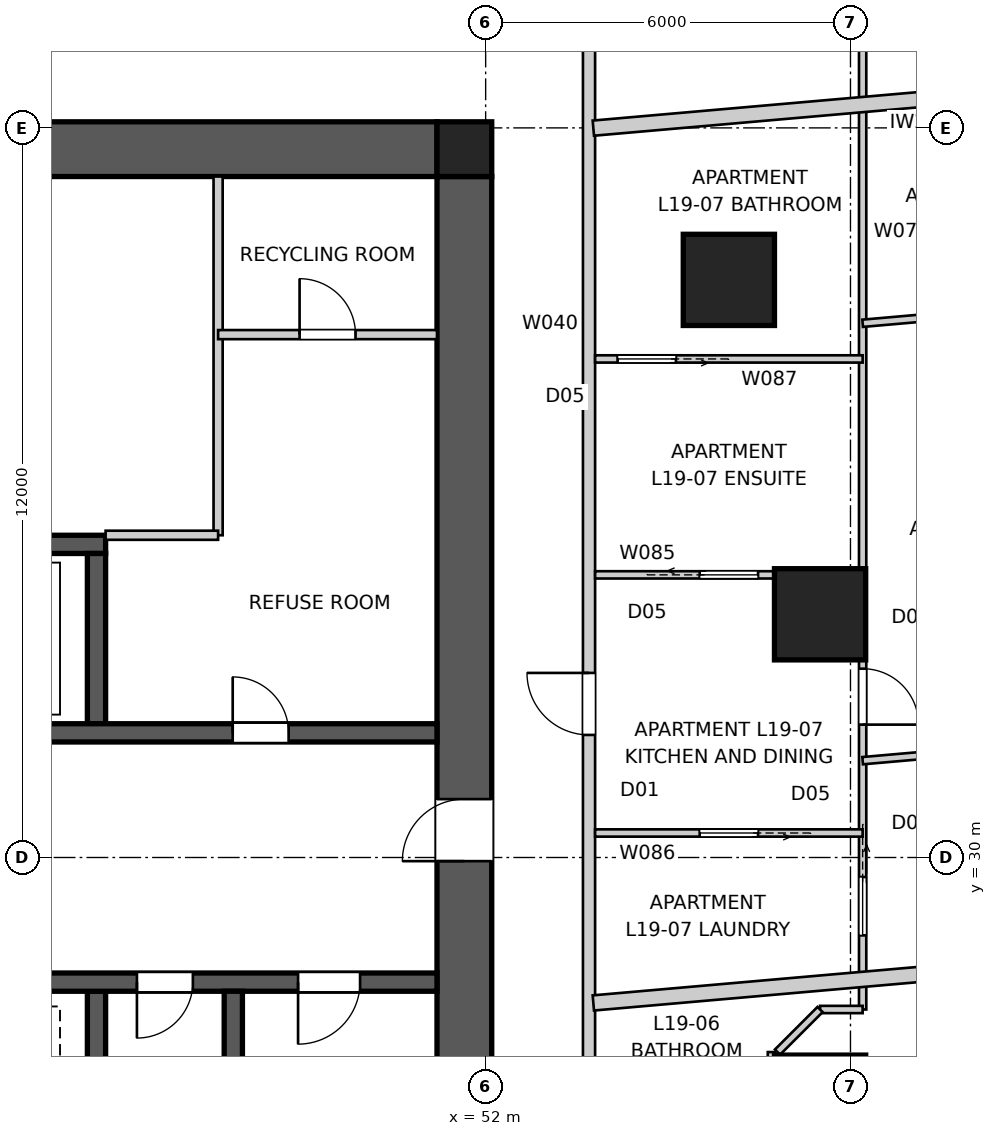
"""IFC4 building model, lengths in metres.
Left out: names, types, materials, properties, quantities, classifications, styles, units other than length and angle.
Written with IfcOpenShell. Run it as: python <this file> out.ifc"""

import sys

from ifc_helpers import new_model, si_unit, direction, frame, frame_2d, origin, origin_2d, place, context, subcontext, project, spatial, polyline, rectangle, outline, extrude, element, fill, save


model = new_model("IFC4")
c1 = context("Model", 3, precision=1e-05, world=origin(), true_north=direction((0.0, 1.0)))
c2 = subcontext(c1, "Body", "Model", "MODEL_VIEW")
j1 = project(units=[si_unit("LENGTHUNIT", "METRE"), si_unit("PLANEANGLEUNIT", "RADIAN")], contexts=[c1])
p1 = place(None, origin())
s1 = spatial("IfcSite", under=j1, at=p1, CompositionType="ELEMENT")
p2 = place(p1, origin())
s2 = spatial("IfcBuilding", under=s1, at=p2, CompositionType="ELEMENT")
p3 = place(p2, frame((0.0, 0.0, 71.0)))
s3 = spatial("IfcBuildingStorey", under=s2, at=p3, CompositionType="ELEMENT", Elevation=71.0)
p4 = place(p3, frame((28.8, 41.65, 0.0), z_axis=(0.0, 0.0, 1.0), x_axis=(1.0, 0.0, 0.0)))
e1 = element("IfcWall", 1, at=p4, inside=s3, PredefinedType="SHEAR", context=c2, shape_type="SweptSolid", body=[
    extrude(outline(polyline([(0.0, -0.45), (22.4, -0.45), (22.4, -0.025), (22.85, -0.025), (22.85, 0.025), (22.4, 0.025), (22.4, 0.45), (0.0, 0.45), (0.0, 0.025), (-0.45, 0.025), (-0.45, -0.025), (0.0, -0.025), (0.0, -0.45)])), origin(), (0.0, 0.0, 1.0), 3.4),
])
p5 = place(p3, frame((51.65, 18.8, 0.0), z_axis=(0.0, 0.0, 1.0), x_axis=(0.0, 1.0, 0.0)))
e2 = element("IfcWall", 2, at=p5, inside=s3, PredefinedType="SHEAR", context=c2, shape_type="SweptSolid", body=[
    extrude(outline(polyline([(0.0, -0.45), (22.4, -0.45), (22.4, -0.025), (22.85, -0.025), (22.85, 0.025), (22.4, 0.025), (22.4, 0.45), (0.0, 0.45), (0.0, 0.025), (-0.45, 0.025), (-0.45, -0.025), (0.0, -0.025), (0.0, -0.45)])), origin(), (0.0, 0.0, 1.0), 3.4),
])
p6 = place(p5, frame((11.14, 0.0, 0.0)))
e3 = element("IfcOpeningElement", 3, at=p6, cuts=e2, PredefinedType="OPENING", context=c2, shape_type="SweptSolid", body=[
    extrude(rectangle(XDim=1.02, YDim=2.4, at=frame_2d((0.51, 1.2))), frame((0.0, 0.46, 0.0), z_axis=(0.0, -1.0, 0.0), x_axis=(1.0, 0.0, 0.0)), (0.0, 0.0, 1.0), 0.92),
])
p7 = place(p3, frame((28.8, 32.05, 0.0), z_axis=(0.0, 0.0, 1.0), x_axis=(1.0, 0.0, 0.0)))
e4 = element("IfcWall", 4, at=p7, inside=s3, PredefinedType="SHEAR", context=c2, shape_type="SweptSolid", body=[
    extrude(rectangle(XDim=22.4, YDim=0.3, at=frame_2d((11.2, 0.0))), origin(), (0.0, 0.0, 1.0), 3.4),
])
p8 = place(p7, frame((19.04, 0.0, 0.0)))
e5 = element("IfcOpeningElement", 5, at=p8, cuts=e4, PredefinedType="OPENING", context=c2, shape_type="SweptSolid", body=[
    extrude(rectangle(XDim=0.92, YDim=2.1, at=frame_2d((0.46, 1.05))), frame((0.0, 0.16, 0.0), z_axis=(0.0, -1.0, 0.0), x_axis=(1.0, 0.0, 0.0)), (0.0, 0.0, 1.0), 0.32),
])
p9 = place(p7, frame((1.265, 0.0, 0.0)))
e6 = element("IfcOpeningElement", 6, at=p9, cuts=e4, PredefinedType="OPENING", context=c2, shape_type="SweptSolid", body=[
    extrude(rectangle(XDim=1.02, YDim=2.1, at=frame_2d((0.51, 1.05))), frame((0.0, 0.16, 0.0), z_axis=(0.0, -1.0, 0.0), x_axis=(1.0, 0.0, 0.0)), (0.0, 0.0, 1.0), 0.32),
])
p10 = place(p7, frame((4.015, 0.0, 0.0)))
e7 = element("IfcOpeningElement", 7, at=p10, cuts=e4, PredefinedType="OPENING", context=c2, shape_type="SweptSolid", body=[
    extrude(rectangle(XDim=0.92, YDim=2.1, at=frame_2d((0.46, 1.05))), frame((0.0, 0.16, 0.0), z_axis=(0.0, -1.0, 0.0), x_axis=(1.0, 0.0, 0.0)), (0.0, 0.0, 1.0), 0.32),
])
p11 = place(p7, frame((6.45, 0.0, 0.0)))
e8 = element("IfcOpeningElement", 8, at=p11, cuts=e4, PredefinedType="OPENING", context=c2, shape_type="SweptSolid", body=[
    extrude(rectangle(XDim=1.1, YDim=2.1, at=frame_2d((0.55, 1.05))), frame((0.0, 0.16, 0.0), z_axis=(0.0, -1.0, 0.0), x_axis=(1.0, 0.0, 0.0)), (0.0, 0.0, 1.0), 0.32),
])
p12 = place(p7, frame((9.25, 0.0, 0.0)))
e9 = element("IfcOpeningElement", 9, at=p12, cuts=e4, PredefinedType="OPENING", context=c2, shape_type="SweptSolid", body=[
    extrude(rectangle(XDim=1.1, YDim=2.1, at=frame_2d((0.55, 1.05))), frame((0.0, 0.16, 0.0), z_axis=(0.0, -1.0, 0.0), x_axis=(1.0, 0.0, 0.0)), (0.0, 0.0, 1.0), 0.32),
])
p13 = place(p7, frame((14.85, 0.0, 0.0)))
e10 = element("IfcOpeningElement", 10, at=p13, cuts=e4, PredefinedType="OPENING", context=c2, shape_type="SweptSolid", body=[
    extrude(rectangle(XDim=1.1, YDim=2.1, at=frame_2d((0.55, 1.05))), frame((0.0, 0.16, 0.0), z_axis=(0.0, -1.0, 0.0), x_axis=(1.0, 0.0, 0.0)), (0.0, 0.0, 1.0), 0.32),
])
p14 = place(p3, frame((51.2, 27.95, 0.0), z_axis=(0.0, 0.0, 1.0), x_axis=(-1.0, 0.0, 0.0)))
e11 = element("IfcWall", 11, at=p14, inside=s3, PredefinedType="SHEAR", context=c2, shape_type="SweptSolid", body=[
    extrude(rectangle(XDim=22.4, YDim=0.3, at=frame_2d((11.2, 0.0))), origin(), (0.0, 0.0, 1.0), 3.4),
])
p15 = place(p14, frame((19.04, 0.0, 0.0)))
e12 = element("IfcOpeningElement", 12, at=p15, cuts=e11, PredefinedType="OPENING", context=c2, shape_type="SweptSolid", body=[
    extrude(rectangle(XDim=0.92, YDim=2.1, at=frame_2d((0.46, 1.05))), frame((0.0, 0.16, 0.0), z_axis=(0.0, -1.0, 0.0), x_axis=(1.0, 0.0, 0.0)), (0.0, 0.0, 1.0), 0.32),
])
p16 = place(p14, frame((1.265, 0.0, 0.0)))
e13 = element("IfcOpeningElement", 13, at=p16, cuts=e11, PredefinedType="OPENING", context=c2, shape_type="SweptSolid", body=[
    extrude(rectangle(XDim=1.02, YDim=2.1, at=frame_2d((0.51, 1.05))), frame((0.0, 0.16, 0.0), z_axis=(0.0, -1.0, 0.0), x_axis=(1.0, 0.0, 0.0)), (0.0, 0.0, 1.0), 0.32),
])
p17 = place(p14, frame((4.015, 0.0, 0.0)))
e14 = element("IfcOpeningElement", 14, at=p17, cuts=e11, PredefinedType="OPENING", context=c2, shape_type="SweptSolid", body=[
    extrude(rectangle(XDim=0.92, YDim=2.1, at=frame_2d((0.46, 1.05))), frame((0.0, 0.16, 0.0), z_axis=(0.0, -1.0, 0.0), x_axis=(1.0, 0.0, 0.0)), (0.0, 0.0, 1.0), 0.32),
])
p18 = place(p14, frame((14.85, 0.0, 0.0)))
e15 = element("IfcOpeningElement", 15, at=p18, cuts=e11, PredefinedType="OPENING", context=c2, shape_type="SweptSolid", body=[
    extrude(rectangle(XDim=1.1, YDim=2.1, at=frame_2d((0.55, 1.05))), frame((0.0, 0.16, 0.0), z_axis=(0.0, -1.0, 0.0), x_axis=(1.0, 0.0, 0.0)), (0.0, 0.0, 1.0), 0.32),
])
p19 = place(p3, frame((34.25, 35.15, 0.0), z_axis=(0.0, 0.0, 1.0), x_axis=(1.0, 0.0, 0.0)))
e16 = element("IfcWall", 16, at=p19, inside=s3, PredefinedType="SHEAR", context=c2, shape_type="SweptSolid", body=[
    extrude(rectangle(XDim=11.5, YDim=0.3, at=frame_2d((5.75, 0.0))), origin(), (0.0, 0.0, 1.0), 3.4),
])
for number, where, z_axis, x_axis in (
    (17, (45.6, 27.8, 0.0), (0.0, 0.0, 1.0), (0.0, -1.0, 0.0)),
    (18, (45.6, 32.2, 0.0), (0.0, 0.0, 1.0), (0.0, 1.0, 0.0)),
):
    element("IfcWall", number, at=place(p3, frame(where, z_axis=z_axis, x_axis=x_axis)), inside=s3, PredefinedType="SHEAR", context=c2, shape_type="SweptSolid", body=[
        extrude(rectangle(XDim=2.8, YDim=0.3, at=frame_2d((1.4, 0.0))), origin(), (0.0, 0.0, 1.0), 3.4),
    ])
p20 = place(p3, frame((47.85, 27.8, 0.0), z_axis=(0.0, 0.0, 1.0), x_axis=(0.0, -1.0, 0.0)))
e19 = element("IfcWall", 19, at=p20, inside=s3, PredefinedType="SHEAR", context=c2, shape_type="SweptSolid", body=[
    extrude(rectangle(XDim=7.7, YDim=0.3, at=frame_2d((3.85, 0.0))), origin(), (0.0, 0.0, 1.0), 3.4),
])
p21 = place(p3, frame((51.65, 41.65, 0.0), z_axis=(0.0, 0.0, 1.0), x_axis=(1.0, 0.0, 0.0)))
e20 = element("IfcColumn", 20, at=p21, inside=s3, PredefinedType="COLUMN", context=c2, shape_type="SweptSolid", body=[
    extrude(rectangle(XDim=0.9, YDim=0.9, at=origin_2d()), origin(), (0.0, 0.0, 1.0), 3.4),
])
for number, where, z_axis, x_axis in (
    (21, (57.5, 26.0, 0.0), (0.0, 0.0, 1.0), (1.0, 0.0, 0.0)),
    (22, (57.5, 34.0, 0.0), (0.0, 0.0, 1.0), (1.0, 0.0, 0.0)),
    (23, (56.0, 39.5, 0.0), (0.0, 0.0, 1.0), (1.0, 0.0, 0.0)),
):
    element("IfcColumn", number, at=place(p3, frame(where, z_axis=z_axis, x_axis=x_axis)), inside=s3, PredefinedType="COLUMN", context=c2, shape_type="SweptSolid", body=[
        extrude(rectangle(XDim=1.5, YDim=1.5, at=origin_2d()), origin(), (0.0, 0.0, 1.0), 3.4),
    ])
p22 = place(p3, frame((53.7, 16.3, 0.0), z_axis=(0.0, 0.0, 1.0), x_axis=(0.0, 1.0, 0.0)))
e24 = element("IfcWall", 24, at=p22, inside=s3, PredefinedType="PARTITIONING", context=c2, shape_type="SweptSolid", body=[
    extrude(rectangle(XDim=28.2, YDim=0.2, at=frame_2d((14.1, 0.0))), origin(), (0.0, 0.0, 1.0), 3.2),
])
p23 = place(p22, frame((15.716, 0.0, 0.0)))
e25 = element("IfcOpeningElement", 25, at=p23, cuts=e24, PredefinedType="OPENING", context=c2, shape_type="SweptSolid", body=[
    extrude(rectangle(XDim=1.02, YDim=2.34, at=frame_2d((0.51, 1.17))), frame((0.0, 0.11, 0.0), z_axis=(0.0, -1.0, 0.0), x_axis=(1.0, 0.0, 0.0)), (0.0, 0.0, 1.0), 0.22),
])
p24 = place(p22, frame((5.572, 0.0, 0.0)))
e26 = element("IfcOpeningElement", 26, at=p24, cuts=e24, PredefinedType="OPENING", context=c2, shape_type="SweptSolid", body=[
    extrude(rectangle(XDim=1.02, YDim=2.34, at=frame_2d((0.51, 1.17))), frame((0.0, 0.11, 0.0), z_axis=(0.0, -1.0, 0.0), x_axis=(1.0, 0.0, 0.0)), (0.0, 0.0, 1.0), 0.22),
])
p25 = place(p22, frame((1.565, 0.0, 0.0)))
e27 = element("IfcOpeningElement", 27, at=p25, cuts=e24, PredefinedType="OPENING", context=c2, shape_type="SweptSolid", body=[
    extrude(rectangle(XDim=1.02, YDim=2.0, at=frame_2d((0.51, 1.0))), frame((0.0, 0.11, 0.0), z_axis=(0.0, -1.0, 0.0), x_axis=(1.0, 0.0, 0.0)), (0.0, 0.0, 1.0), 0.22),
])
p26 = place(p3, frame((64.466, 42.932, 0.0), z_axis=(0.0, 0.0, 1.0), x_axis=(-0.996193939644, -0.08716441141, 0.0)))
e28 = element("IfcWall", 28, at=p26, inside=s3, PredefinedType="PARTITIONING", context=c2, shape_type="SweptSolid", body=[
    extrude(rectangle(XDim=10.736, YDim=0.25, at=frame_2d((5.368, 0.0))), origin(), (0.0, 0.0, 1.0), 3.2),
])
p27 = place(p3, frame((65.715, 28.653, 0.0), z_axis=(0.0, 0.0, 1.0), x_axis=(-0.996195220272, -0.087149773992, 0.0)))
e29 = element("IfcWall", 29, at=p27, inside=s3, PredefinedType="PARTITIONING", context=c2, shape_type="SweptSolid", body=[
    extrude(rectangle(XDim=11.99, YDim=0.25, at=frame_2d((5.995, 0.0))), origin(), (0.0, 0.0, 1.0), 3.2),
])
p28 = place(p3, frame((47.6, 41.2, 0.0), z_axis=(0.0, 0.0, 1.0), x_axis=(0.0, -1.0, 0.0)))
e30 = element("IfcWall", 30, at=p28, inside=s3, PredefinedType="SOLIDWALL", context=c2, shape_type="SweptSolid", body=[
    extrude(rectangle(XDim=5.9, YDim=0.15, at=frame_2d((2.95, 0.0))), origin(), (0.0, 0.0, 1.0), 3.2),
])
p29 = place(p3, frame((47.6, 35.3, 0.0), z_axis=(0.0, 0.0, 1.0), x_axis=(-1.0, 0.0, 0.0)))
e31 = element("IfcWall", 31, at=p29, inside=s3, PredefinedType="SOLIDWALL", context=c2, shape_type="SweptSolid", body=[
    extrude(rectangle(XDim=1.85, YDim=0.15, at=frame_2d((0.925, 0.0))), origin(), (0.0, 0.0, 1.0), 3.2),
])
p30 = place(p3, frame((47.6, 38.6, 0.0), z_axis=(0.0, 0.0, 1.0), x_axis=(1.0, 0.0, 0.0)))
e32 = element("IfcWall", 32, at=p30, inside=s3, PredefinedType="SOLIDWALL", context=c2, shape_type="SweptSolid", body=[
    extrude(rectangle(XDim=3.6, YDim=0.15, at=frame_2d((1.8, 0.0))), origin(), (0.0, 0.0, 1.0), 3.2),
])
p31 = place(p30, frame((1.34, 0.0, 0.0)))
e33 = element("IfcOpeningElement", 33, at=p31, cuts=e32, PredefinedType="OPENING", context=c2, shape_type="SweptSolid", body=[
    extrude(rectangle(XDim=0.92, YDim=2.1, at=frame_2d((0.46, 1.05))), frame((0.0, 0.085, 0.0), z_axis=(0.0, -1.0, 0.0), x_axis=(1.0, 0.0, 0.0)), (0.0, 0.0, 1.0), 0.17),
])
p32 = place(p3, frame((58.2, 48.2, 0.0), z_axis=(0.0, 0.0, 1.0), x_axis=(0.0, -1.0, 0.0)))
e34 = element("IfcWall", 34, at=p32, inside=s3, PredefinedType="PARTITIONING", context=c2, shape_type="SweptSolid", body=[
    extrude(rectangle(XDim=20.7, YDim=0.12, at=frame_2d((10.35, 0.0))), origin(), (0.0, 0.0, 1.0), 3.2),
])
p33 = place(p32, frame((15.095, 0.0, 0.0)))
e35 = element("IfcOpeningElement", 35, at=p33, cuts=e34, PredefinedType="OPENING", context=c2, shape_type="SweptSolid", body=[
    extrude(rectangle(XDim=0.92, YDim=2.34, at=frame_2d((0.46, 1.17))), frame((0.0, 0.07, 0.0), z_axis=(0.0, -1.0, 0.0), x_axis=(1.0, 0.0, 0.0)), (0.0, 0.0, 1.0), 0.14),
])
p34 = place(p32, frame((18.521, 0.0, 0.0)))
e36 = element("IfcOpeningElement", 36, at=p34, cuts=e34, PredefinedType="OPENING", context=c2, shape_type="SweptSolid", body=[
    extrude(rectangle(XDim=0.96, YDim=2.1, at=frame_2d((0.48, 1.05))), frame((0.0, 0.07, 0.0), z_axis=(0.0, -1.0, 0.0), x_axis=(1.0, 0.0, 0.0)), (0.0, 0.0, 1.0), 0.14),
])
p35 = place(p32, frame((0.675, 0.0, 0.0)))
e37 = element("IfcOpeningElement", 37, at=p35, cuts=e34, PredefinedType="OPENING", context=c2, shape_type="SweptSolid", body=[
    extrude(rectangle(XDim=0.92, YDim=2.34, at=frame_2d((0.46, 1.17))), frame((0.0, 0.07, 0.0), z_axis=(0.0, -1.0, 0.0), x_axis=(1.0, 0.0, 0.0)), (0.0, 0.0, 1.0), 0.14),
])
p36 = place(p32, frame((3.872, 0.0, 0.0)))
e38 = element("IfcOpeningElement", 38, at=p36, cuts=e34, PredefinedType="OPENING", context=c2, shape_type="SweptSolid", body=[
    extrude(rectangle(XDim=0.96, YDim=2.1, at=frame_2d((0.48, 1.05))), frame((0.0, 0.07, 0.0), z_axis=(0.0, -1.0, 0.0), x_axis=(1.0, 0.0, 0.0)), (0.0, 0.0, 1.0), 0.14),
])
p37 = place(p3, frame((58.2, 27.5, 0.0), z_axis=(0.0, 0.0, 1.0), x_axis=(-1.0, 0.0, 0.0)))
e39 = element("IfcWall", 39, at=p37, inside=s3, PredefinedType="PARTITIONING", context=c2, shape_type="SweptSolid", body=[
    extrude(rectangle(XDim=0.7, YDim=0.12, at=frame_2d((0.35, 0.0))), origin(), (0.0, 0.0, 1.0), 3.2),
])
p38 = place(p3, frame((57.5, 27.5, 0.0), z_axis=(0.0, 0.0, 1.0), x_axis=(-0.707106781187, -0.707106781187, 0.0)))
e40 = element("IfcWall", 40, at=p38, inside=s3, PredefinedType="PARTITIONING", context=c2, shape_type="SweptSolid", body=[
    extrude(rectangle(XDim=0.99, YDim=0.12, at=frame_2d((0.495, 0.0))), origin(), (0.0, 0.0, 1.0), 3.2),
])
p39 = place(p3, frame((56.7, 26.8, 0.0), z_axis=(0.0, 0.0, 1.0), x_axis=(0.0, -1.0, 0.0)))
e41 = element("IfcWall", 41, at=p39, inside=s3, PredefinedType="PARTITIONING", context=c2, shape_type="SweptSolid", body=[
    extrude(rectangle(XDim=1.6, YDim=0.12, at=frame_2d((0.8, 0.0))), origin(), (0.0, 0.0, 1.0), 3.2),
])
p40 = place(p3, frame((53.8, 34.648, 0.0), z_axis=(0.0, 0.0, 1.0), x_axis=(1.0, 0.0, 0.0)))
e42 = element("IfcWall", 42, at=p40, inside=s3, PredefinedType="PARTITIONING", context=c2, shape_type="SweptSolid", body=[
    extrude(rectangle(XDim=4.4, YDim=0.12, at=frame_2d((2.2, 0.0))), origin(), (0.0, 0.0, 1.0), 3.2),
])
p41 = place(p40, frame((1.72, 0.0, 0.0)))
e43 = element("IfcOpeningElement", 43, at=p41, cuts=e42, PredefinedType="OPENING", context=c2, shape_type="SweptSolid", body=[
    extrude(rectangle(XDim=0.96, YDim=2.1, at=frame_2d((0.48, 1.05))), frame((0.0, 0.07, 0.0), z_axis=(0.0, -1.0, 0.0), x_axis=(1.0, 0.0, 0.0)), (0.0, 0.0, 1.0), 0.14),
])
p42 = place(p3, frame((58.2, 30.403, 0.0), z_axis=(0.0, 0.0, 1.0), x_axis=(-1.0, 0.0, 0.0)))
e44 = element("IfcWall", 44, at=p42, inside=s3, PredefinedType="PARTITIONING", context=c2, shape_type="SweptSolid", body=[
    extrude(rectangle(XDim=4.4, YDim=0.12, at=frame_2d((2.2, 0.0))), origin(), (0.0, 0.0, 1.0), 3.2),
])
p43 = place(p42, frame((1.72, 0.0, 0.0)))
e45 = element("IfcOpeningElement", 45, at=p43, cuts=e44, PredefinedType="OPENING", context=c2, shape_type="SweptSolid", body=[
    extrude(rectangle(XDim=0.96, YDim=2.1, at=frame_2d((0.48, 1.05))), frame((0.0, 0.07, 0.0), z_axis=(0.0, -1.0, 0.0), x_axis=(1.0, 0.0, 0.0)), (0.0, 0.0, 1.0), 0.14),
])
p44 = place(p3, frame((58.2, 38.2, 0.0), z_axis=(0.0, 0.0, 1.0), x_axis=(-1.0, 0.0, 0.0)))
e46 = element("IfcWall", 46, at=p44, inside=s3, PredefinedType="PARTITIONING", context=c2, shape_type="SweptSolid", body=[
    extrude(rectangle(XDim=4.4, YDim=0.12, at=frame_2d((2.2, 0.0))), origin(), (0.0, 0.0, 1.0), 3.2),
])
p45 = place(p44, frame((3.07, 0.0, 0.0)))
e47 = element("IfcOpeningElement", 47, at=p45, cuts=e46, PredefinedType="OPENING", context=c2, shape_type="SweptSolid", body=[
    extrude(rectangle(XDim=0.96, YDim=2.1, at=frame_2d((0.48, 1.05))), frame((0.0, 0.07, 0.0), z_axis=(0.0, -1.0, 0.0), x_axis=(1.0, 0.0, 0.0)), (0.0, 0.0, 1.0), 0.14),
])
p46 = place(p3, frame((65.363, 32.219, 0.0), z_axis=(0.0, 0.0, 1.0), x_axis=(-0.996194454549, -0.087158526409, 0.0)))
e48 = element("IfcWall", 48, at=p46, inside=s3, PredefinedType="PARTITIONING", context=c2, shape_type="SweptSolid", body=[
    extrude(rectangle(XDim=7.19, YDim=0.12, at=frame_2d((3.595, 0.0))), origin(), (0.0, 0.0, 1.0), 3.2),
])
p47 = place(p3, frame((58.2, 38.786, 0.0), z_axis=(0.0, 0.0, 1.0), x_axis=(0.996195090105, 0.087151261897, 0.0)))
e49 = element("IfcWall", 49, at=p47, inside=s3, PredefinedType="PARTITIONING", context=c2, shape_type="SweptSolid", body=[
    extrude(rectangle(XDim=6.563, YDim=0.12, at=frame_2d((3.282, 0.0))), origin(), (0.0, 0.0, 1.0), 3.2),
])
p48 = place(p47, frame((2.842, 0.0, 0.0)))
e50 = element("IfcOpeningElement", 50, at=p48, cuts=e49, PredefinedType="OPENING", context=c2, shape_type="SweptSolid", body=[
    extrude(rectangle(XDim=0.92, YDim=2.34, at=frame_2d((0.46, 1.17))), frame((0.0, 0.07, 0.0), z_axis=(0.0, -1.0, 0.0), x_axis=(1.0, 0.0, 0.0)), (0.0, 0.0, 1.0), 0.14),
])
p49 = place(p8, origin())
e51 = element("IfcDoor", 51, at=p49, inside=s3, OperationType="SINGLE_SWING_LEFT", PredefinedType="DOOR", context=c2, shape_type="SweptSolid", body=[
    extrude(rectangle(XDim=0.92, YDim=2.1, at=frame_2d((0.46, 1.05))), frame((0.0, 0.025, 0.0), z_axis=(0.0, -1.0, 0.0), x_axis=(1.0, 0.0, 0.0)), (0.0, 0.0, 1.0), 0.05),
])
fill(e5, e51)
p50 = place(p16, origin())
e52 = element("IfcDoor", 52, at=p50, inside=s3, OperationType="SINGLE_SWING_RIGHT", PredefinedType="DOOR", context=c2, shape_type="SweptSolid", body=[
    extrude(rectangle(XDim=1.02, YDim=2.1, at=frame_2d((0.51, 1.05))), frame((0.0, 0.025, 0.0), z_axis=(0.0, -1.0, 0.0), x_axis=(1.0, 0.0, 0.0)), (0.0, 0.0, 1.0), 0.05),
])
fill(e13, e52)
p51 = place(p17, origin())
e53 = element("IfcDoor", 53, at=p51, inside=s3, OperationType="SINGLE_SWING_RIGHT", PredefinedType="DOOR", context=c2, shape_type="SweptSolid", body=[
    extrude(rectangle(XDim=0.92, YDim=2.1, at=frame_2d((0.46, 1.05))), frame((0.0, 0.025, 0.0), z_axis=(0.0, -1.0, 0.0), x_axis=(1.0, 0.0, 0.0)), (0.0, 0.0, 1.0), 0.05),
])
fill(e14, e53)
p52 = place(p23, origin())
e54 = element("IfcDoor", 54, at=p52, inside=s3, OperationType="SINGLE_SWING_RIGHT", PredefinedType="DOOR", context=c2, shape_type="SweptSolid", body=[
    extrude(rectangle(XDim=1.02, YDim=2.34, at=frame_2d((0.51, 1.17))), frame((0.0, 0.025, 0.0), z_axis=(0.0, -1.0, 0.0), x_axis=(1.0, 0.0, 0.0)), (0.0, 0.0, 1.0), 0.05),
])
fill(e25, e54)
p53 = place(p31, origin())
e55 = element("IfcDoor", 55, at=p53, inside=s3, OperationType="SINGLE_SWING_LEFT", PredefinedType="DOOR", context=c2, shape_type="SweptSolid", body=[
    extrude(rectangle(XDim=0.92, YDim=2.1, at=frame_2d((0.46, 1.05))), frame((0.0, 0.025, 0.0), z_axis=(0.0, -1.0, 0.0), x_axis=(1.0, 0.0, 0.0)), (0.0, 0.0, 1.0), 0.05),
])
fill(e33, e55)
p54 = place(p41, origin())
e56 = element("IfcDoor", 56, at=p54, inside=s3, OperationType="SLIDING_TO_LEFT", PredefinedType="DOOR", context=c2, shape_type="SweptSolid", body=[
    extrude(rectangle(XDim=0.96, YDim=2.1, at=frame_2d((0.48, 1.05))), frame((0.0, 0.025, 0.0), z_axis=(0.0, -1.0, 0.0), x_axis=(1.0, 0.0, 0.0)), (0.0, 0.0, 1.0), 0.05),
])
fill(e43, e56)
p55 = place(p43, origin())
e57 = element("IfcDoor", 57, at=p55, inside=s3, OperationType="SLIDING_TO_LEFT", PredefinedType="DOOR", context=c2, shape_type="SweptSolid", body=[
    extrude(rectangle(XDim=0.96, YDim=2.1, at=frame_2d((0.48, 1.05))), frame((0.0, 0.025, 0.0), z_axis=(0.0, -1.0, 0.0), x_axis=(1.0, 0.0, 0.0)), (0.0, 0.0, 1.0), 0.05),
])
fill(e45, e57)
p56 = place(p33, origin())
e58 = element("IfcDoor", 58, at=p56, inside=s3, OperationType="SINGLE_SWING_RIGHT", PredefinedType="DOOR", context=c2, shape_type="SweptSolid", body=[
    extrude(rectangle(XDim=0.92, YDim=2.34, at=frame_2d((0.46, 1.17))), frame((0.0, 0.025, 0.0), z_axis=(0.0, -1.0, 0.0), x_axis=(1.0, 0.0, 0.0)), (0.0, 0.0, 1.0), 0.05),
])
fill(e35, e58)
p57 = place(p45, origin())
e59 = element("IfcDoor", 59, at=p57, inside=s3, OperationType="SLIDING_TO_LEFT", PredefinedType="DOOR", context=c2, shape_type="SweptSolid", body=[
    extrude(rectangle(XDim=0.96, YDim=2.1, at=frame_2d((0.48, 1.05))), frame((0.0, 0.025, 0.0), z_axis=(0.0, -1.0, 0.0), x_axis=(1.0, 0.0, 0.0)), (0.0, 0.0, 1.0), 0.05),
])
fill(e47, e59)
p58 = place(p34, origin())
e60 = element("IfcDoor", 60, at=p58, inside=s3, OperationType="SLIDING_TO_LEFT", PredefinedType="DOOR", context=c2, shape_type="SweptSolid", body=[
    extrude(rectangle(XDim=0.96, YDim=2.1, at=frame_2d((0.48, 1.05))), frame((0.0, 0.025, 0.0), z_axis=(0.0, -1.0, 0.0), x_axis=(1.0, 0.0, 0.0)), (0.0, 0.0, 1.0), 0.05),
])
fill(e36, e60)
p59 = place(p6, origin())
e61 = element("IfcDoor", 61, at=p59, inside=s3, OperationType="SINGLE_SWING_LEFT", PredefinedType="DOOR", context=c2, shape_type="SweptSolid", body=[
    extrude(rectangle(XDim=1.02, YDim=2.4, at=frame_2d((0.51, 1.2))), frame((0.0, 0.025, 0.0), z_axis=(0.0, -1.0, 0.0), x_axis=(1.0, 0.0, 0.0)), (0.0, 0.0, 1.0), 0.05),
])
fill(e3, e61)
save(model, sys.argv[1])
